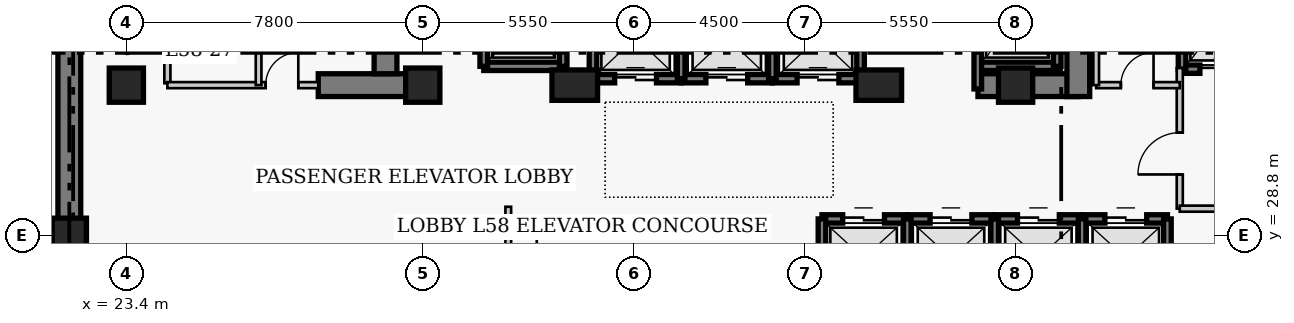
"""IFC4 building model, lengths in metres.
Left out: names, types, materials, properties, quantities, classifications, styles, units other than length and angle.
Written with IfcOpenShell. Run it as: python <this file> out.ifc"""

import sys

from ifc_helpers import new_model, si_unit, direction, frame, frame_2d, origin, origin_2d, place, context, subcontext, project, spatial, rectangle, extrude, element, fill, save


model = new_model("IFC4")
c1 = context("Model", 3, precision=1e-05, world=origin(), true_north=direction((0.0, 1.0)))
c2 = subcontext(c1, "Body", "Model", "MODEL_VIEW")
j1 = project(units=[si_unit("LENGTHUNIT", "METRE"), si_unit("PLANEANGLEUNIT", "RADIAN")], contexts=[c1])
p1 = place(None, origin())
s1 = spatial("IfcSite", under=j1, at=p1, CompositionType="ELEMENT")
p2 = place(p1, origin())
s2 = spatial("IfcBuilding", under=s1, at=p2, CompositionType="ELEMENT")
p3 = place(p2, frame((0.0, 0.0, 231.9)))
s3 = spatial("IfcBuildingStorey", under=s2, at=p3, CompositionType="ELEMENT", Elevation=231.9)
p4 = place(p3, frame((21.9, 27.05, 0.0), z_axis=(0.0, 0.0, 1.0), x_axis=(0.0, 1.0, 0.0)))
e1 = element("IfcWall", 1, at=p4, inside=s3, PredefinedType="SHEAR", context=c2, shape_type="SweptSolid", body=[
    extrude(rectangle(XDim=13.57, YDim=0.6, at=frame_2d((6.785, 0.0))), origin(), (0.0, 0.0, 1.0), 4.6),
])
p5 = place(p3, frame((28.45, 32.75, 0.0), z_axis=(0.0, 0.0, 1.0), x_axis=(1.0, 0.0, 0.0)))
e2 = element("IfcWall", 2, at=p5, inside=s3, PredefinedType="SHEAR", context=c2, shape_type="SweptSolid", body=[
    extrude(rectangle(XDim=2.4, YDim=0.6, at=frame_2d((1.2, 0.0))), origin(), (0.0, 0.0, 1.0), 4.6),
])
p6 = place(p3, frame((45.81, 32.75, 0.0), z_axis=(0.0, 0.0, 1.0), x_axis=(1.0, 0.0, 0.0)))
e3 = element("IfcWall", 3, at=p6, inside=s3, PredefinedType="SHEAR", context=c2, shape_type="SweptSolid", body=[
    extrude(rectangle(XDim=2.64, YDim=0.6, at=frame_2d((1.32, 0.0))), origin(), (0.0, 0.0, 1.0), 4.6),
])
p7 = place(p3, frame((30.22, 33.05, 0.0), z_axis=(0.0, 0.0, 1.0), x_axis=(0.0, 1.0, 0.0)))
e4 = element("IfcWall", 4, at=p7, inside=s3, PredefinedType="SHEAR", context=c2, shape_type="SweptSolid", body=[
    extrude(rectangle(XDim=7.27, YDim=0.6, at=frame_2d((3.635, 0.0))), origin(), (0.0, 0.0, 1.0), 4.6),
])
p8 = place(p3, frame((48.45, 32.45, 0.0), z_axis=(0.0, 0.0, 1.0), x_axis=(0.0, 1.0, 0.0)))
e5 = element("IfcWall", 5, at=p8, inside=s3, PredefinedType="SHEAR", context=c2, shape_type="SweptSolid", body=[
    extrude(rectangle(XDim=7.87, YDim=0.6, at=frame_2d((3.935, 0.0))), origin(), (0.0, 0.0, 1.0), 4.6),
])
p9 = place(p8, frame((5.75, 0.0, 0.0)))
e6 = element("IfcOpeningElement", 6, at=p9, cuts=e5, PredefinedType="OPENING", context=c2, shape_type="SweptSolid", body=[
    extrude(rectangle(XDim=1.1, YDim=2.15, at=frame_2d((0.55, 1.075))), frame((0.0, 0.31, 0.0), z_axis=(0.0, -1.0, 0.0), x_axis=(1.0, 0.0, 0.0)), (0.0, 0.0, 1.0), 0.62),
])
for number, where, z_axis, x_axis in (
    (7, (21.9, 28.8, 0.0), (0.0, 0.0, 1.0), (1.0, 0.0, 0.0)),
    (8, (23.4, 32.75, 0.0), (0.0, 0.0, 1.0), (1.0, 0.0, 0.0)),
    (9, (31.2, 32.75, 0.0), (0.0, 0.0, 1.0), (1.0, 0.0, 0.0)),
):
    element("IfcColumn", number, at=place(p3, frame(where, z_axis=z_axis, x_axis=x_axis)), inside=s3, PredefinedType="COLUMN", context=c2, shape_type="SweptSolid", body=[
        extrude(rectangle(XDim=0.9, YDim=0.9, at=origin_2d()), origin(), (0.0, 0.0, 1.0), 4.6),
    ])
for number, where, z_axis, x_axis in (
    (10, (35.2, 32.75, 0.0), (0.0, 0.0, 1.0), (1.0, 0.0, 0.0)),
    (11, (43.2, 32.75, 0.0), (0.0, 0.0, 1.0), (1.0, 0.0, 0.0)),
):
    element("IfcColumn", number, at=place(p3, frame(where, z_axis=z_axis, x_axis=x_axis)), inside=s3, PredefinedType="COLUMN", context=c2, shape_type="SweptSolid", body=[
        extrude(rectangle(XDim=1.2, YDim=0.8, at=origin_2d()), origin(), (0.0, 0.0, 1.0), 4.6),
    ])
p10 = place(p3, frame((46.8, 32.75, 0.0), z_axis=(0.0, 0.0, 1.0), x_axis=(1.0, 0.0, 0.0)))
e12 = element("IfcColumn", 12, at=p10, inside=s3, PredefinedType="COLUMN", context=c2, shape_type="SweptSolid", body=[
    extrude(rectangle(XDim=0.9, YDim=0.9, at=origin_2d()), origin(), (0.0, 0.0, 1.0), 4.6),
])
p11 = place(p3, frame((41.705, 29.23, 0.0), z_axis=(0.0, 0.0, 1.0), x_axis=(1.0, 0.0, 0.0)))
e13 = element("IfcWall", 13, at=p11, inside=s3, PredefinedType="SHEAR", context=c2, shape_type="SweptSolid", body=[
    extrude(rectangle(XDim=2.245, YDim=0.22, at=frame_2d((1.123, 0.0))), origin(), (0.0, 0.0, 1.0), 4.6),
])
p12 = place(p11, frame((0.545, 0.0, 0.0)))
e14 = element("IfcOpeningElement", 14, at=p12, cuts=e13, PredefinedType="OPENING", context=c2, shape_type="SweptSolid", body=[
    extrude(rectangle(XDim=1.1, YDim=2.15, at=frame_2d((0.55, 1.075))), frame((0.0, 0.12, 0.0), z_axis=(0.0, -1.0, 0.0), x_axis=(1.0, 0.0, 0.0)), (0.0, 0.0, 1.0), 0.24),
])
p13 = place(p3, frame((41.705, 27.17, 0.0), z_axis=(0.0, 0.0, 1.0), x_axis=(0.0, 1.0, 0.0)))
e15 = element("IfcWall", 15, at=p13, inside=s3, PredefinedType="SHEAR", context=c2, shape_type="SweptSolid", body=[
    extrude(rectangle(XDim=2.06, YDim=0.2, at=frame_2d((1.03, 0.0))), origin(), (0.0, 0.0, 1.0), 4.6),
])
p14 = place(p3, frame((43.95, 29.23, 0.0), z_axis=(0.0, 0.0, 1.0), x_axis=(1.0, 0.0, 0.0)))
e16 = element("IfcWall", 16, at=p14, inside=s3, PredefinedType="SHEAR", context=c2, shape_type="SweptSolid", body=[
    extrude(rectangle(XDim=2.3, YDim=0.22, at=frame_2d((1.15, 0.0))), origin(), (0.0, 0.0, 1.0), 4.6),
])
p15 = place(p14, frame((0.6, 0.0, 0.0)))
e17 = element("IfcOpeningElement", 17, at=p15, cuts=e16, PredefinedType="OPENING", context=c2, shape_type="SweptSolid", body=[
    extrude(rectangle(XDim=1.1, YDim=2.15, at=frame_2d((0.55, 1.075))), frame((0.0, 0.12, 0.0), z_axis=(0.0, -1.0, 0.0), x_axis=(1.0, 0.0, 0.0)), (0.0, 0.0, 1.0), 0.24),
])
p16 = place(p3, frame((43.95, 27.17, 0.0), z_axis=(0.0, 0.0, 1.0), x_axis=(0.0, 1.0, 0.0)))
e18 = element("IfcWall", 18, at=p16, inside=s3, PredefinedType="SHEAR", context=c2, shape_type="SweptSolid", body=[
    extrude(rectangle(XDim=2.06, YDim=0.2, at=frame_2d((1.03, 0.0))), origin(), (0.0, 0.0, 1.0), 4.6),
])
p17 = place(p3, frame((46.25, 29.23, 0.0), z_axis=(0.0, 0.0, 1.0), x_axis=(1.0, 0.0, 0.0)))
e19 = element("IfcWall", 19, at=p17, inside=s3, PredefinedType="SHEAR", context=c2, shape_type="SweptSolid", body=[
    extrude(rectangle(XDim=2.3, YDim=0.22, at=frame_2d((1.15, 0.0))), origin(), (0.0, 0.0, 1.0), 4.6),
])
p18 = place(p17, frame((0.6, 0.0, 0.0)))
e20 = element("IfcOpeningElement", 20, at=p18, cuts=e19, PredefinedType="OPENING", context=c2, shape_type="SweptSolid", body=[
    extrude(rectangle(XDim=1.1, YDim=2.15, at=frame_2d((0.55, 1.075))), frame((0.0, 0.12, 0.0), z_axis=(0.0, -1.0, 0.0), x_axis=(1.0, 0.0, 0.0)), (0.0, 0.0, 1.0), 0.24),
])
p19 = place(p3, frame((46.25, 27.17, 0.0), z_axis=(0.0, 0.0, 1.0), x_axis=(0.0, 1.0, 0.0)))
e21 = element("IfcWall", 21, at=p19, inside=s3, PredefinedType="SHEAR", context=c2, shape_type="SweptSolid", body=[
    extrude(rectangle(XDim=2.06, YDim=0.2, at=frame_2d((1.03, 0.0))), origin(), (0.0, 0.0, 1.0), 4.6),
])
p20 = place(p3, frame((48.55, 29.23, 0.0), z_axis=(0.0, 0.0, 1.0), x_axis=(1.0, 0.0, 0.0)))
e22 = element("IfcWall", 22, at=p20, inside=s3, PredefinedType="SHEAR", context=c2, shape_type="SweptSolid", body=[
    extrude(rectangle(XDim=2.245, YDim=0.22, at=frame_2d((1.123, 0.0))), origin(), (0.0, 0.0, 1.0), 4.6),
])
p21 = place(p20, frame((0.6, 0.0, 0.0)))
e23 = element("IfcOpeningElement", 23, at=p21, cuts=e22, PredefinedType="OPENING", context=c2, shape_type="SweptSolid", body=[
    extrude(rectangle(XDim=1.1, YDim=2.15, at=frame_2d((0.55, 1.075))), frame((0.0, 0.12, 0.0), z_axis=(0.0, -1.0, 0.0), x_axis=(1.0, 0.0, 0.0)), (0.0, 0.0, 1.0), 0.24),
])
for number, where, z_axis, x_axis in (
    (24, (48.55, 27.17, 0.0), (0.0, 0.0, 1.0), (0.0, 1.0, 0.0)),
    (25, (50.795, 27.17, 0.0), (0.0, 0.0, 1.0), (0.0, 1.0, 0.0)),
):
    element("IfcWall", number, at=place(p3, frame(where, z_axis=z_axis, x_axis=x_axis)), inside=s3, PredefinedType="SHEAR", context=c2, shape_type="SweptSolid", body=[
        extrude(rectangle(XDim=2.06, YDim=0.2, at=frame_2d((1.03, 0.0))), origin(), (0.0, 0.0, 1.0), 4.6),
    ])
p22 = place(p3, frame((35.68, 32.92, 0.0), z_axis=(0.0, 0.0, 1.0), x_axis=(1.0, 0.0, 0.0)))
e26 = element("IfcWall", 26, at=p22, inside=s3, PredefinedType="SHEAR", context=c2, shape_type="SweptSolid", body=[
    extrude(rectangle(XDim=2.32, YDim=0.22, at=frame_2d((1.16, 0.0))), origin(), (0.0, 0.0, 1.0), 4.6),
])
p23 = place(p22, frame((0.57, 0.0, 0.0)))
e27 = element("IfcOpeningElement", 27, at=p23, cuts=e26, PredefinedType="OPENING", context=c2, shape_type="SweptSolid", body=[
    extrude(rectangle(XDim=1.1, YDim=2.15, at=frame_2d((0.55, 1.075))), frame((0.0, 0.12, 0.0), z_axis=(0.0, -1.0, 0.0), x_axis=(1.0, 0.0, 0.0)), (0.0, 0.0, 1.0), 0.24),
])
p24 = place(p3, frame((35.68, 32.92, 0.0), z_axis=(0.0, 0.0, 1.0), x_axis=(0.0, 1.0, 0.0)))
e28 = element("IfcWall", 28, at=p24, inside=s3, PredefinedType="SHEAR", context=c2, shape_type="SweptSolid", body=[
    extrude(rectangle(XDim=2.16, YDim=0.2, at=frame_2d((1.08, 0.0))), origin(), (0.0, 0.0, 1.0), 4.6),
])
p25 = place(p3, frame((38.0, 32.92, 0.0), z_axis=(0.0, 0.0, 1.0), x_axis=(1.0, 0.0, 0.0)))
e29 = element("IfcWall", 29, at=p25, inside=s3, PredefinedType="SHEAR", context=c2, shape_type="SweptSolid", body=[
    extrude(rectangle(XDim=2.4, YDim=0.22, at=frame_2d((1.2, 0.0))), origin(), (0.0, 0.0, 1.0), 4.6),
])
p26 = place(p25, frame((0.65, 0.0, 0.0)))
e30 = element("IfcOpeningElement", 30, at=p26, cuts=e29, PredefinedType="OPENING", context=c2, shape_type="SweptSolid", body=[
    extrude(rectangle(XDim=1.1, YDim=2.15, at=frame_2d((0.55, 1.075))), frame((0.0, 0.12, 0.0), z_axis=(0.0, -1.0, 0.0), x_axis=(1.0, 0.0, 0.0)), (0.0, 0.0, 1.0), 0.24),
])
p27 = place(p3, frame((38.0, 32.92, 0.0), z_axis=(0.0, 0.0, 1.0), x_axis=(0.0, 1.0, 0.0)))
e31 = element("IfcWall", 31, at=p27, inside=s3, PredefinedType="SHEAR", context=c2, shape_type="SweptSolid", body=[
    extrude(rectangle(XDim=2.16, YDim=0.2, at=frame_2d((1.08, 0.0))), origin(), (0.0, 0.0, 1.0), 4.6),
])
p28 = place(p3, frame((40.4, 32.92, 0.0), z_axis=(0.0, 0.0, 1.0), x_axis=(1.0, 0.0, 0.0)))
e32 = element("IfcWall", 32, at=p28, inside=s3, PredefinedType="SHEAR", context=c2, shape_type="SweptSolid", body=[
    extrude(rectangle(XDim=2.32, YDim=0.22, at=frame_2d((1.16, 0.0))), origin(), (0.0, 0.0, 1.0), 4.6),
])
p29 = place(p28, frame((0.65, 0.0, 0.0)))
e33 = element("IfcOpeningElement", 33, at=p29, cuts=e32, PredefinedType="OPENING", context=c2, shape_type="SweptSolid", body=[
    extrude(rectangle(XDim=1.1, YDim=2.15, at=frame_2d((0.55, 1.075))), frame((0.0, 0.12, 0.0), z_axis=(0.0, -1.0, 0.0), x_axis=(1.0, 0.0, 0.0)), (0.0, 0.0, 1.0), 0.24),
])
for number, where, z_axis, x_axis in (
    (34, (40.4, 32.92, 0.0), (0.0, 0.0, 1.0), (0.0, 1.0, 0.0)),
    (35, (42.72, 32.92, 0.0), (0.0, 0.0, 1.0), (0.0, 1.0, 0.0)),
):
    element("IfcWall", number, at=place(p3, frame(where, z_axis=z_axis, x_axis=x_axis)), inside=s3, PredefinedType="SHEAR", context=c2, shape_type="SweptSolid", body=[
        extrude(rectangle(XDim=2.16, YDim=0.2, at=frame_2d((1.08, 0.0))), origin(), (0.0, 0.0, 1.0), 4.6),
    ])
p30 = place(p3, frame((51.18, 33.17, 0.0), z_axis=(0.0, 0.0, 1.0), x_axis=(1.0, 0.0, 0.0)))
e36 = element("IfcWall", 36, at=p30, inside=s3, PredefinedType="SHEAR", context=c2, shape_type="SweptSolid", body=[
    extrude(rectangle(XDim=2.42, YDim=0.22, at=frame_2d((1.21, 0.0))), origin(), (0.0, 0.0, 1.0), 4.6),
])
p31 = place(p30, frame((0.47, 0.0, 0.0)))
e37 = element("IfcOpeningElement", 37, at=p31, cuts=e36, PredefinedType="OPENING", context=c2, shape_type="SweptSolid", body=[
    extrude(rectangle(XDim=1.3, YDim=2.15, at=frame_2d((0.65, 1.075))), frame((0.0, 0.12, 0.0), z_axis=(0.0, -1.0, 0.0), x_axis=(1.0, 0.0, 0.0)), (0.0, 0.0, 1.0), 0.24),
])
p32 = place(p3, frame((51.18, 33.17, 0.0), z_axis=(0.0, 0.0, 1.0), x_axis=(0.0, 1.0, 0.0)))
e38 = element("IfcWall", 38, at=p32, inside=s3, PredefinedType="SHEAR", context=c2, shape_type="SweptSolid", body=[
    extrude(rectangle(XDim=2.86, YDim=0.2, at=frame_2d((1.43, 0.0))), origin(), (0.0, 0.0, 1.0), 4.6),
])
p33 = place(p3, frame((32.805, 33.245, 0.0), z_axis=(0.0, 0.0, 1.0), x_axis=(1.0, 0.0, 0.0)))
e39 = element("IfcWall", 39, at=p33, inside=s3, PredefinedType="SHEAR", context=c2, shape_type="SweptSolid", body=[
    extrude(rectangle(XDim=2.09, YDim=0.22, at=frame_2d((1.045, 0.0))), origin(), (0.0, 0.0, 1.0), 4.6),
])
for number, where, z_axis, x_axis in (
    (40, (32.805, 33.245, 0.0), (0.0, 0.0, 1.0), (0.0, 1.0, 0.0)),
    (41, (34.895, 33.245, 0.0), (0.0, 0.0, 1.0), (0.0, 1.0, 0.0)),
):
    element("IfcWall", number, at=place(p3, frame(where, z_axis=z_axis, x_axis=x_axis)), inside=s3, PredefinedType="SHEAR", context=c2, shape_type="SweptSolid", body=[
        extrude(rectangle(XDim=2.91, YDim=0.2, at=frame_2d((1.455, 0.0))), origin(), (0.0, 0.0, 1.0), 4.6),
    ])
p34 = place(p3, frame((45.805, 33.245, 0.0), z_axis=(0.0, 0.0, 1.0), x_axis=(1.0, 0.0, 0.0)))
e42 = element("IfcWall", 42, at=p34, inside=s3, PredefinedType="SHEAR", context=c2, shape_type="SweptSolid", body=[
    extrude(rectangle(XDim=2.09, YDim=0.22, at=frame_2d((1.045, 0.0))), origin(), (0.0, 0.0, 1.0), 4.6),
])
p35 = place(p3, frame((45.805, 32.65, 0.0), z_axis=(0.0, 0.0, 1.0), x_axis=(0.0, 1.0, 0.0)))
e43 = element("IfcWall", 43, at=p35, inside=s3, PredefinedType="SHEAR", context=c2, shape_type="SweptSolid", body=[
    extrude(rectangle(XDim=3.505, YDim=0.2, at=frame_2d((1.752, 0.0))), origin(), (0.0, 0.0, 1.0), 4.6),
])
p36 = place(p3, frame((47.895, 33.245, 0.0), z_axis=(0.0, 0.0, 1.0), x_axis=(0.0, 1.0, 0.0)))
e44 = element("IfcWall", 44, at=p36, inside=s3, PredefinedType="SHEAR", context=c2, shape_type="SweptSolid", body=[
    extrude(rectangle(XDim=2.91, YDim=0.2, at=frame_2d((1.455, 0.0))), origin(), (0.0, 0.0, 1.0), 4.6),
])
p37 = place(p3, frame((24.48, 32.8, 0.0), z_axis=(0.0, 0.0, 1.0), x_axis=(0.0, 1.0, 0.0)))
e45 = element("IfcWall", 45, at=p37, inside=s3, PredefinedType="PARTITIONING", context=c2, shape_type="SweptSolid", body=[
    extrude(rectangle(XDim=3.57, YDim=0.16, at=frame_2d((1.785, 0.0))), origin(), (0.0, 0.0, 1.0), 4.35),
])
p38 = place(p37, frame((1.604, 0.0, 0.0)))
e46 = element("IfcOpeningElement", 46, at=p38, cuts=e45, PredefinedType="OPENING", context=c2, shape_type="SweptSolid", body=[
    extrude(rectangle(XDim=0.9, YDim=2.1, at=frame_2d((0.45, 1.05))), frame((0.0, 0.09, 0.0), z_axis=(0.0, -1.0, 0.0), x_axis=(1.0, 0.0, 0.0)), (0.0, 0.0, 1.0), 0.18),
])
p39 = place(p3, frame((51.12, 29.5, 0.0), z_axis=(0.0, 0.0, 1.0), x_axis=(0.0, 1.0, 0.0)))
e47 = element("IfcWall", 47, at=p39, inside=s3, PredefinedType="PARTITIONING", context=c2, shape_type="SweptSolid", body=[
    extrude(rectangle(XDim=3.7, YDim=0.16, at=frame_2d((1.85, 0.0))), origin(), (0.0, 0.0, 1.0), 4.35),
])
p40 = place(p39, frame((0.9, 0.0, 0.0)))
e48 = element("IfcOpeningElement", 48, at=p40, cuts=e47, PredefinedType="OPENING", context=c2, shape_type="SweptSolid", body=[
    extrude(rectangle(XDim=1.1, YDim=2.15, at=frame_2d((0.55, 1.075))), frame((0.0, 0.09, 0.0), z_axis=(0.0, -1.0, 0.0), x_axis=(1.0, 0.0, 0.0)), (0.0, 0.0, 1.0), 0.18),
])
p41 = place(p3, frame((51.12, 29.5, 0.0), z_axis=(0.0, 0.0, 1.0), x_axis=(1.0, 0.0, 0.0)))
e49 = element("IfcWall", 49, at=p41, inside=s3, PredefinedType="PARTITIONING", context=c2, shape_type="SweptSolid", body=[
    extrude(rectangle(XDim=5.63, YDim=0.16, at=frame_2d((2.815, 0.0))), origin(), (0.0, 0.0, 1.0), 4.35),
])
p42 = place(p3, frame((24.48, 32.75, 0.0), z_axis=(0.0, 0.0, 1.0), x_axis=(1.0, 0.0, 0.0)))
e50 = element("IfcWall", 50, at=p42, inside=s3, PredefinedType="PARTITIONING", context=c2, shape_type="SweptSolid", body=[
    extrude(rectangle(XDim=3.97, YDim=0.16, at=frame_2d((1.985, 0.0))), origin(), (0.0, 0.0, 1.0), 4.35),
])
p43 = place(p42, frame((2.585, 0.0, 0.0)))
e51 = element("IfcOpeningElement", 51, at=p43, cuts=e50, PredefinedType="OPENING", context=c2, shape_type="SweptSolid", body=[
    extrude(rectangle(XDim=0.86, YDim=2.05, at=frame_2d((0.43, 1.025))), frame((0.0, 0.09, 0.0), z_axis=(0.0, -1.0, 0.0), x_axis=(1.0, 0.0, 0.0)), (0.0, 0.0, 1.0), 0.18),
])
p44 = place(p3, frame((48.92, 32.75, 0.0), z_axis=(0.0, 0.0, 1.0), x_axis=(1.0, 0.0, 0.0)))
e52 = element("IfcWall", 52, at=p44, inside=s3, PredefinedType="PARTITIONING", context=c2, shape_type="SweptSolid", body=[
    extrude(rectangle(XDim=2.2, YDim=0.16, at=frame_2d((1.1, 0.0))), origin(), (0.0, 0.0, 1.0), 4.35),
])
p45 = place(p44, frame((0.65, 0.0, 0.0)))
e53 = element("IfcOpeningElement", 53, at=p45, cuts=e52, PredefinedType="OPENING", context=c2, shape_type="SweptSolid", body=[
    extrude(rectangle(XDim=0.86, YDim=2.05, at=frame_2d((0.43, 1.025))), frame((0.0, 0.09, 0.0), z_axis=(0.0, -1.0, 0.0), x_axis=(1.0, 0.0, 0.0)), (0.0, 0.0, 1.0), 0.18),
])
for number, where, z_axis, x_axis in (
    (54, (48.92, 32.75, 0.0), (0.0, 0.0, 1.0), (0.0, 1.0, 0.0)),
    (55, (26.88, 32.75, 0.0), (0.0, 0.0, 1.0), (0.0, 1.0, 0.0)),
):
    element("IfcWall", number, at=place(p3, frame(where, z_axis=z_axis, x_axis=x_axis)), inside=s3, PredefinedType="PARTITIONING", context=c2, shape_type="SweptSolid", body=[
        extrude(rectangle(XDim=3.62, YDim=0.15, at=frame_2d((1.81, 0.0))), origin(), (0.0, 0.0, 1.0), 4.35),
    ])
p46 = place(p3, frame((33.45, 24.98, 0.0), z_axis=(0.0, 0.0, 1.0), x_axis=(0.0, 1.0, 0.0)))
e56 = element("IfcWall", 56, at=p46, inside=s3, PredefinedType="PARTITIONING", context=c2, shape_type="SweptSolid", body=[
    extrude(rectangle(XDim=4.57, YDim=0.15, at=frame_2d((2.285, 0.0))), origin(), (0.0, 0.0, 1.0), 4.35),
])
p47 = place(p12, origin())
e57 = element("IfcDoor", 57, at=p47, inside=s3, OperationType="DOUBLE_DOOR_SLIDING", PredefinedType="DOOR", context=c2, shape_type="SweptSolid", body=[
    extrude(rectangle(XDim=1.1, YDim=2.15, at=frame_2d((0.55, 1.075))), frame((0.0, 0.025, 0.0), z_axis=(0.0, -1.0, 0.0), x_axis=(1.0, 0.0, 0.0)), (0.0, 0.0, 1.0), 0.05),
])
fill(e14, e57)
p48 = place(p15, origin())
e58 = element("IfcDoor", 58, at=p48, inside=s3, OperationType="DOUBLE_DOOR_SLIDING", PredefinedType="DOOR", context=c2, shape_type="SweptSolid", body=[
    extrude(rectangle(XDim=1.1, YDim=2.15, at=frame_2d((0.55, 1.075))), frame((0.0, 0.025, 0.0), z_axis=(0.0, -1.0, 0.0), x_axis=(1.0, 0.0, 0.0)), (0.0, 0.0, 1.0), 0.05),
])
fill(e17, e58)
p49 = place(p18, origin())
e59 = element("IfcDoor", 59, at=p49, inside=s3, OperationType="DOUBLE_DOOR_SLIDING", PredefinedType="DOOR", context=c2, shape_type="SweptSolid", body=[
    extrude(rectangle(XDim=1.1, YDim=2.15, at=frame_2d((0.55, 1.075))), frame((0.0, 0.025, 0.0), z_axis=(0.0, -1.0, 0.0), x_axis=(1.0, 0.0, 0.0)), (0.0, 0.0, 1.0), 0.05),
])
fill(e20, e59)
p50 = place(p21, origin())
e60 = element("IfcDoor", 60, at=p50, inside=s3, OperationType="DOUBLE_DOOR_SLIDING", PredefinedType="DOOR", context=c2, shape_type="SweptSolid", body=[
    extrude(rectangle(XDim=1.1, YDim=2.15, at=frame_2d((0.55, 1.075))), frame((0.0, 0.025, 0.0), z_axis=(0.0, -1.0, 0.0), x_axis=(1.0, 0.0, 0.0)), (0.0, 0.0, 1.0), 0.05),
])
fill(e23, e60)
p51 = place(p23, origin())
e61 = element("IfcDoor", 61, at=p51, inside=s3, OperationType="DOUBLE_DOOR_SLIDING", PredefinedType="DOOR", context=c2, shape_type="SweptSolid", body=[
    extrude(rectangle(XDim=1.1, YDim=2.15, at=frame_2d((0.55, 1.075))), frame((0.0, 0.025, 0.0), z_axis=(0.0, -1.0, 0.0), x_axis=(1.0, 0.0, 0.0)), (0.0, 0.0, 1.0), 0.05),
])
fill(e27, e61)
p52 = place(p26, origin())
e62 = element("IfcDoor", 62, at=p52, inside=s3, OperationType="DOUBLE_DOOR_SLIDING", PredefinedType="DOOR", context=c2, shape_type="SweptSolid", body=[
    extrude(rectangle(XDim=1.1, YDim=2.15, at=frame_2d((0.55, 1.075))), frame((0.0, 0.025, 0.0), z_axis=(0.0, -1.0, 0.0), x_axis=(1.0, 0.0, 0.0)), (0.0, 0.0, 1.0), 0.05),
])
fill(e30, e62)
p53 = place(p29, origin())
e63 = element("IfcDoor", 63, at=p53, inside=s3, OperationType="DOUBLE_DOOR_SLIDING", PredefinedType="DOOR", context=c2, shape_type="SweptSolid", body=[
    extrude(rectangle(XDim=1.1, YDim=2.15, at=frame_2d((0.55, 1.075))), frame((0.0, 0.025, 0.0), z_axis=(0.0, -1.0, 0.0), x_axis=(1.0, 0.0, 0.0)), (0.0, 0.0, 1.0), 0.05),
])
fill(e33, e63)
p54 = place(p31, origin())
e64 = element("IfcDoor", 64, at=p54, inside=s3, OperationType="DOUBLE_DOOR_SLIDING", PredefinedType="DOOR", context=c2, shape_type="SweptSolid", body=[
    extrude(rectangle(XDim=1.3, YDim=2.15, at=frame_2d((0.65, 1.075))), frame((0.0, 0.025, 0.0), z_axis=(0.0, -1.0, 0.0), x_axis=(1.0, 0.0, 0.0)), (0.0, 0.0, 1.0), 0.05),
])
fill(e37, e64)
p55 = place(p40, origin())
e65 = element("IfcDoor", 65, at=p55, inside=s3, OperationType="SINGLE_SWING_LEFT", PredefinedType="DOOR", context=c2, shape_type="SweptSolid", body=[
    extrude(rectangle(XDim=1.1, YDim=2.15, at=frame_2d((0.55, 1.075))), frame((0.0, 0.025, 0.0), z_axis=(0.0, -1.0, 0.0), x_axis=(1.0, 0.0, 0.0)), (0.0, 0.0, 1.0), 0.05),
])
fill(e48, e65)
p56 = place(p43, origin())
e66 = element("IfcDoor", 66, at=p56, inside=s3, OperationType="SINGLE_SWING_RIGHT", PredefinedType="DOOR", context=c2, shape_type="SweptSolid", body=[
    extrude(rectangle(XDim=0.86, YDim=2.05, at=frame_2d((0.43, 1.025))), frame((0.0, 0.025, 0.0), z_axis=(0.0, -1.0, 0.0), x_axis=(1.0, 0.0, 0.0)), (0.0, 0.0, 1.0), 0.05),
])
fill(e51, e66)
p57 = place(p45, origin())
e67 = element("IfcDoor", 67, at=p57, inside=s3, OperationType="SINGLE_SWING_RIGHT", PredefinedType="DOOR", context=c2, shape_type="SweptSolid", body=[
    extrude(rectangle(XDim=0.86, YDim=2.05, at=frame_2d((0.43, 1.025))), frame((0.0, 0.025, 0.0), z_axis=(0.0, -1.0, 0.0), x_axis=(1.0, 0.0, 0.0)), (0.0, 0.0, 1.0), 0.05),
])
fill(e53, e67)
save(model, sys.argv[1])
